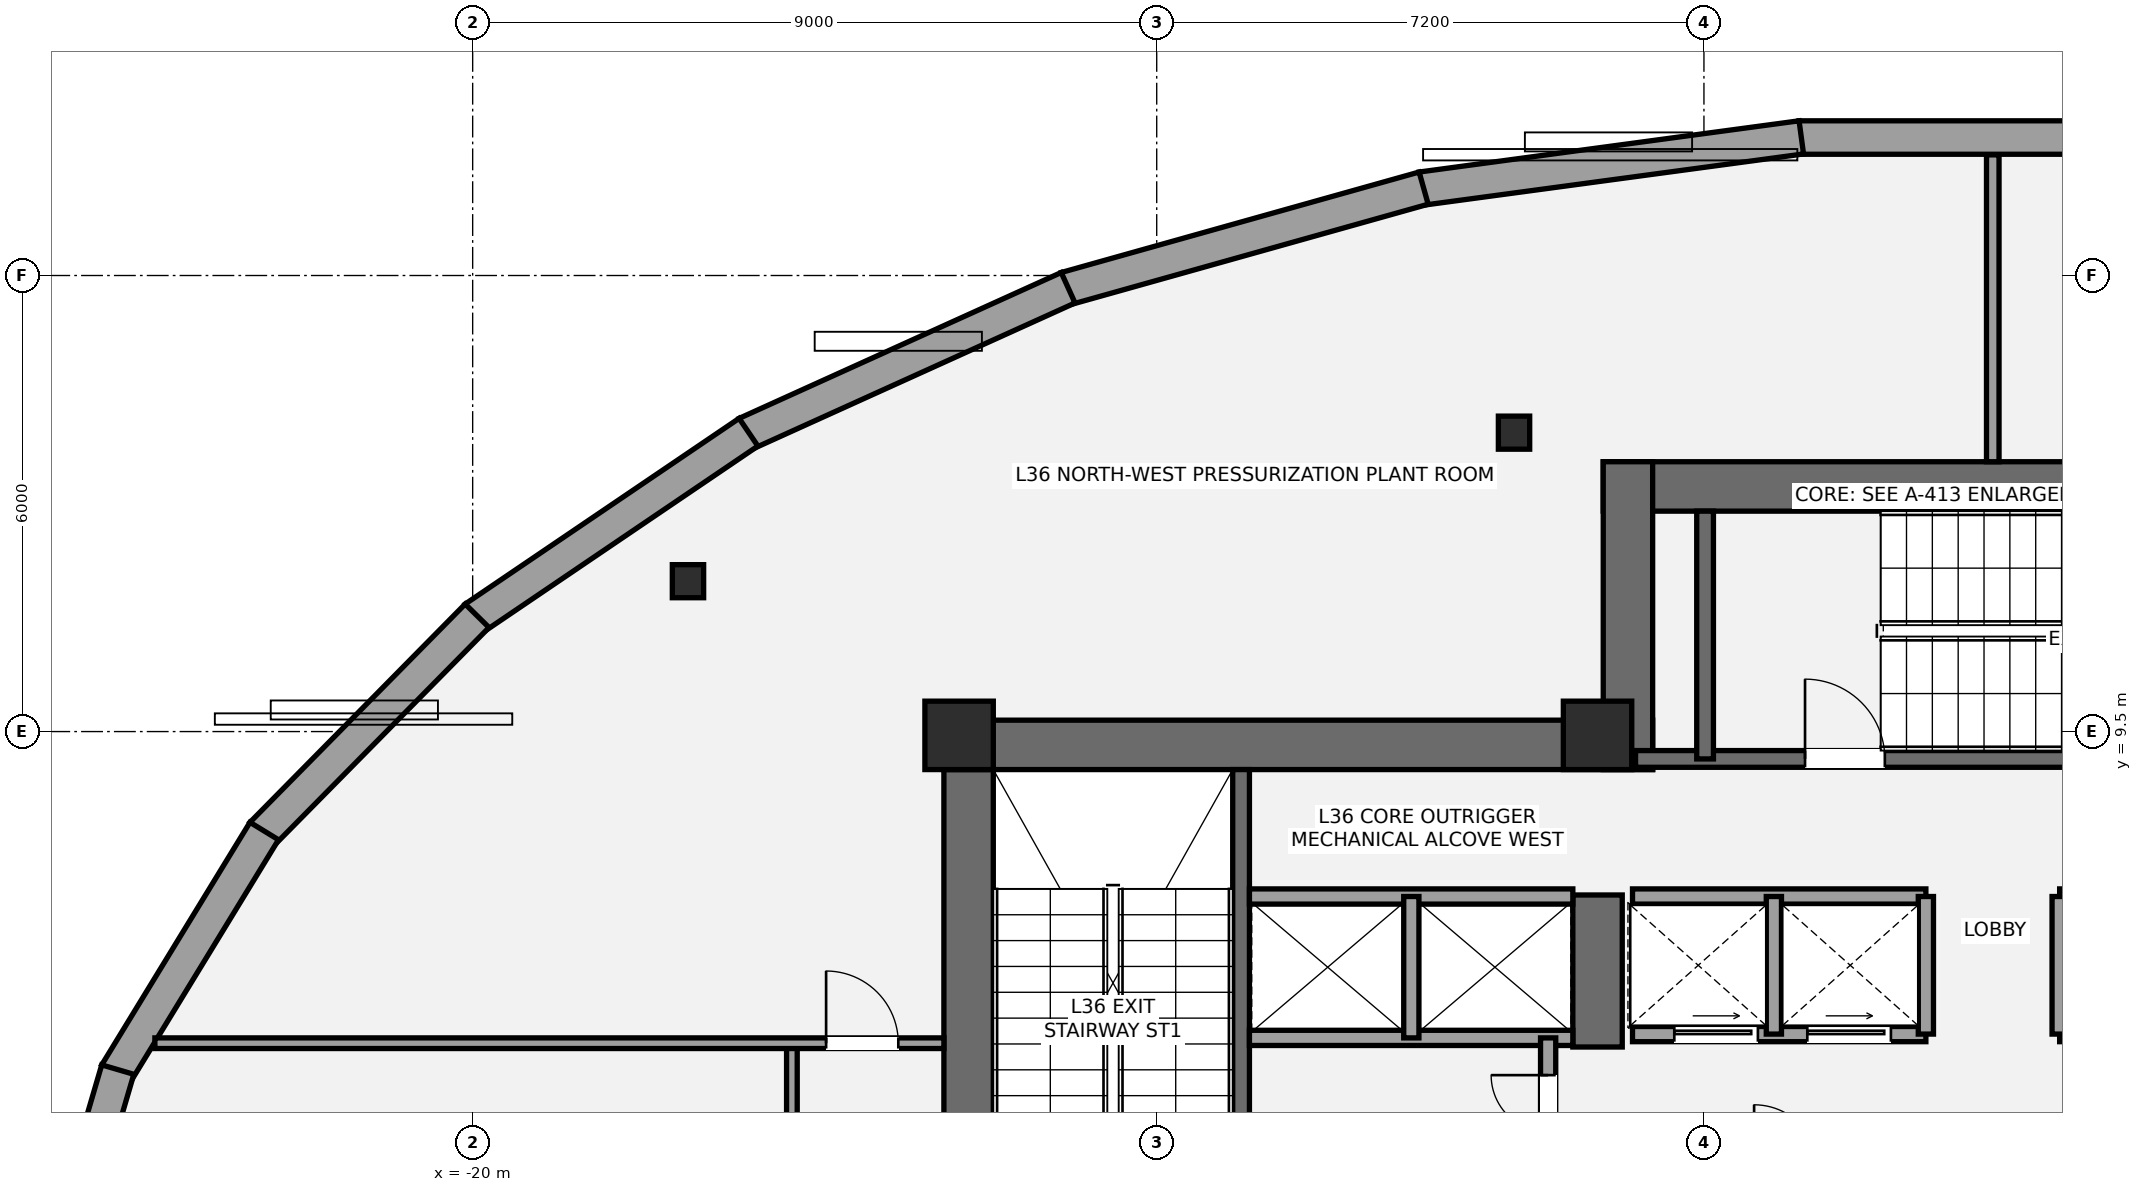
"""IFC4 building model, lengths in metres.
Left out: names, types, materials, properties, quantities, classifications, styles, units other than length and angle.
Written with IfcOpenShell. Run it as: python <this file> out.ifc"""

import sys

from ifc_helpers import new_model, si_unit, direction, frame, frame_2d, origin, origin_2d, place, context, subcontext, project, spatial, rectangle, i_section, extrude, element, fill, save


model = new_model("IFC4")
c1 = context("Model", 3, precision=1e-05, world=origin(), true_north=direction((0.0, 1.0)))
c2 = subcontext(c1, "Body", "Model", "MODEL_VIEW")
j1 = project(units=[si_unit("LENGTHUNIT", "METRE"), si_unit("PLANEANGLEUNIT", "RADIAN")], contexts=[c1])
p1 = place(None, origin())
s1 = spatial("IfcSite", under=j1, at=p1, CompositionType="ELEMENT")
p2 = place(p1, origin())
s2 = spatial("IfcBuilding", under=s1, at=p2, CompositionType="ELEMENT")
p3 = place(p2, frame((0.0, 0.0, 135.1)))
s3 = spatial("IfcBuildingStorey", under=s2, at=p3, CompositionType="ELEMENT", Elevation=135.1)
p4 = place(p3, frame((-13.475, 1.2, 0.0), z_axis=(0.0, 0.0, 1.0), x_axis=(0.0, 1.0, 0.0)))
e1 = element("IfcWall", 1, at=p4, inside=s3, PredefinedType="SHEAR", context=c2, shape_type="SweptSolid", body=[
    extrude(rectangle(XDim=8.45, YDim=0.65, at=frame_2d((4.225, 0.0))), origin(), (0.0, 0.0, 1.0), 4.5),
])
p5 = place(p3, frame((-13.8, 9.325, 0.0), z_axis=(0.0, 0.0, 1.0), x_axis=(1.0, 0.0, 0.0)))
e2 = element("IfcWall", 2, at=p5, inside=s3, PredefinedType="SHEAR", context=c2, shape_type="SweptSolid", body=[
    extrude(rectangle(XDim=9.325, YDim=0.65, at=frame_2d((4.663, 0.0))), origin(), (0.0, 0.0, 1.0), 4.5),
])
p6 = place(p3, frame((-5.2, 5.35, 0.0), z_axis=(0.0, 0.0, 1.0), x_axis=(0.0, 1.0, 0.0)))
e3 = element("IfcWall", 3, at=p6, inside=s3, PredefinedType="SHEAR", context=c2, shape_type="SweptSolid", body=[
    extrude(rectangle(XDim=2.0, YDim=0.65, at=frame_2d((1.0, 0.0))), origin(), (0.0, 0.0, 1.0), 4.5),
])
p7 = place(p3, frame((-9.89, 1.85, 0.0), z_axis=(0.0, 0.0, 1.0), x_axis=(0.0, 1.0, 0.0)))
e4 = element("IfcWall", 4, at=p7, inside=s3, PredefinedType="SHEAR", context=c2, shape_type="SweptSolid", body=[
    extrude(rectangle(XDim=7.15, YDim=0.22, at=frame_2d((3.575, 0.0))), origin(), (0.0, 0.0, 1.0), 4.5),
])
p8 = place(p3, frame((-5.125, 12.725, 0.0), z_axis=(0.0, 0.0, 1.0), x_axis=(1.0, 0.0, 0.0)))
e5 = element("IfcWall", 5, at=p8, inside=s3, PredefinedType="SHEAR", context=c2, shape_type="SweptSolid", body=[
    extrude(rectangle(XDim=10.25, YDim=0.65, at=frame_2d((5.125, 0.0))), origin(), (0.0, 0.0, 1.0), 4.5),
])
p9 = place(p3, frame((-4.8, 9.0, 0.0), z_axis=(0.0, 0.0, 1.0), x_axis=(0.0, 1.0, 0.0)))
e6 = element("IfcWall", 6, at=p9, inside=s3, PredefinedType="SHEAR", context=c2, shape_type="SweptSolid", body=[
    extrude(rectangle(XDim=4.05, YDim=0.65, at=frame_2d((2.025, 0.0))), origin(), (0.0, 0.0, 1.0), 4.5),
])
p10 = place(p3, frame((-4.7, 9.14, 0.0), z_axis=(0.0, 0.0, 1.0), x_axis=(1.0, 0.0, 0.0)))
e7 = element("IfcWall", 7, at=p10, inside=s3, PredefinedType="SHEAR", context=c2, shape_type="SweptSolid", body=[
    extrude(rectangle(XDim=9.3, YDim=0.22, at=frame_2d((4.65, 0.0))), origin(), (0.0, 0.0, 1.0), 4.5),
])
p11 = place(p10, frame((2.23, 0.0, 0.0)))
e8 = element("IfcOpeningElement", 8, at=p11, cuts=e7, PredefinedType="OPENING", context=c2, shape_type="SweptSolid", body=[
    extrude(rectangle(XDim=1.05, YDim=2.15, at=frame_2d((0.525, 1.075))), frame((0.0, 0.12, 0.0), z_axis=(0.0, -1.0, 0.0), x_axis=(1.0, 0.0, 0.0)), (0.0, 0.0, 1.0), 0.24),
])
p12 = place(p3, frame((-3.785, 9.14, 0.0), z_axis=(0.0, 0.0, 1.0), x_axis=(0.0, 1.0, 0.0)))
e9 = element("IfcWall", 9, at=p12, inside=s3, PredefinedType="SHEAR", context=c2, shape_type="SweptSolid", body=[
    extrude(rectangle(XDim=3.26, YDim=0.22, at=frame_2d((1.63, 0.0))), origin(), (0.0, 0.0, 1.0), 4.5),
])
for number, where, z_axis, x_axis in (
    (10, (-13.6, 9.45, 0.0), (0.0, 0.0, 1.0), (1.0, 0.0, 0.0)),
    (11, (-5.2, 9.45, 0.0), (0.0, 0.0, 1.0), (1.0, 0.0, 0.0)),
):
    element("IfcColumn", number, at=place(p3, frame(where, z_axis=z_axis, x_axis=x_axis)), inside=s3, PredefinedType="COLUMN", context=c2, shape_type="SweptSolid", body=[
        extrude(rectangle(XDim=0.9, YDim=0.9, at=origin_2d()), origin(), (0.0, 0.0, 1.0), 4.5),
    ])
for number, where, z_axis, x_axis in (
    (12, (-6.299, 13.433, 0.0), (0.0, 0.0, 1.0), (1.0, 0.0, 0.0)),
    (13, (-17.167, 11.478, 0.0), (0.0, 0.0, 1.0), (1.0, 0.0, 0.0)),
):
    element("IfcColumn", number, at=place(p3, frame(where, z_axis=z_axis, x_axis=x_axis)), inside=s3, PredefinedType="COLUMN", context=c2, shape_type="SweptSolid", body=[
        extrude(i_section(OverallWidth=0.412, OverallDepth=0.435, WebThickness=0.036, FlangeThickness=0.057, at=origin_2d()), origin(), (0.0, 0.0, 1.0), 4.5),
    ])
p13 = place(p3, frame((-2.548, 17.315, 0.0), z_axis=(0.0, 0.0, 1.0), x_axis=(1.0, 0.0, 0.0)))
e14 = element("IfcWall", 14, at=p13, inside=s3, PredefinedType="STANDARD", context=c2, shape_type="SweptSolid", body=[
    extrude(rectangle(XDim=5.097, YDim=0.44, at=frame_2d((2.548, 0.0))), origin(), (0.0, 0.0, 1.0), 3.498),
])
p14 = place(p3, frame((-7.518, 16.643, 0.0), z_axis=(0.0, 0.0, 1.0), x_axis=(0.99103751038, 0.133583880086, 0.0)))
e15 = element("IfcWall", 15, at=p14, inside=s3, PredefinedType="STANDARD", context=c2, shape_type="SweptSolid", body=[
    extrude(rectangle(XDim=5.044, YDim=0.44, at=frame_2d((2.522, 0.0))), origin(), (0.0, 0.0, 1.0), 3.498),
])
p15 = place(p3, frame((-12.197, 15.328, 0.0), z_axis=(0.0, 0.0, 1.0), x_axis=(0.962790668442, 0.270248272446, 0.0)))
e16 = element("IfcWall", 16, at=p15, inside=s3, PredefinedType="STANDARD", context=c2, shape_type="SweptSolid", body=[
    extrude(rectangle(XDim=4.891, YDim=0.44, at=frame_2d((2.445, 0.0))), origin(), (0.0, 0.0, 1.0), 3.498),
])
p16 = place(p3, frame((-16.403, 13.42, 0.0), z_axis=(0.0, 0.0, 1.0), x_axis=(0.910938924115, 0.412541242221, 0.0)))
e17 = element("IfcWall", 17, at=p16, inside=s3, PredefinedType="STANDARD", context=c2, shape_type="SweptSolid", body=[
    extrude(rectangle(XDim=4.652, YDim=0.44, at=frame_2d((2.326, 0.0))), origin(), (0.0, 0.0, 1.0), 3.498),
])
p17 = place(p3, frame((-19.975, 10.996, 0.0), z_axis=(0.0, 0.0, 1.0), x_axis=(0.827816201219, 0.56099940909, 0.0)))
e18 = element("IfcWall", 18, at=p17, inside=s3, PredefinedType="STANDARD", context=c2, shape_type="SweptSolid", body=[
    extrude(rectangle(XDim=4.354, YDim=0.44, at=frame_2d((2.177, 0.0))), origin(), (0.0, 0.0, 1.0), 3.498),
])
p18 = place(p3, frame((-22.773, 8.152, 0.0), z_axis=(0.0, 0.0, 1.0), x_axis=(0.702094935552, 0.712083352897, 0.0)))
e19 = element("IfcWall", 19, at=p18, inside=s3, PredefinedType="STANDARD", context=c2, shape_type="SweptSolid", body=[
    extrude(rectangle(XDim=4.033, YDim=0.44, at=frame_2d((2.017, 0.0))), origin(), (0.0, 0.0, 1.0), 3.498),
])
p19 = place(p3, frame((-24.693, 5.0, 0.0), z_axis=(0.0, 0.0, 1.0), x_axis=(0.521476412293, 0.853265698022, 0.0)))
e20 = element("IfcWall", 20, at=p19, inside=s3, PredefinedType="STANDARD", context=c2, shape_type="SweptSolid", body=[
    extrude(rectangle(XDim=3.74, YDim=0.44, at=frame_2d((1.87, 0.0))), origin(), (0.0, 0.0, 1.0), 3.498),
])
p20 = place(p3, frame((-25.664, 1.665, 0.0), z_axis=(0.0, 0.0, 1.0), x_axis=(0.28170956188, 0.959499725245, 0.0)))
e21 = element("IfcWall", 21, at=p20, inside=s3, PredefinedType="STANDARD", context=c2, shape_type="SweptSolid", body=[
    extrude(rectangle(XDim=3.531, YDim=0.44, at=frame_2d((1.765, 0.0))), origin(), (0.0, 0.0, 1.0), 3.498),
])
for number, where, z_axis, x_axis in (
    (22, (-9.78, 5.47, 0.0), (0.0, 0.0, 1.0), (1.0, 0.0, 0.0)),
    (23, (-9.78, 7.33, 0.0), (0.0, 0.0, 1.0), (1.0, 0.0, 0.0)),
):
    element("IfcWall", number, at=place(p3, frame(where, z_axis=z_axis, x_axis=x_axis)), inside=s3, PredefinedType="SOLIDWALL", context=c2, shape_type="SweptSolid", body=[
        extrude(rectangle(XDim=4.255, YDim=0.2, at=frame_2d((2.127, 0.0))), origin(), (0.0, 0.0, 1.0), 4.28),
    ])
p21 = place(p3, frame((-7.65, 5.47, 0.0), z_axis=(0.0, 0.0, 1.0), x_axis=(0.0, 1.0, 0.0)))
e24 = element("IfcWall", 24, at=p21, inside=s3, PredefinedType="SOLIDWALL", context=c2, shape_type="SweptSolid", body=[
    extrude(rectangle(XDim=1.86, YDim=0.2, at=frame_2d((0.93, 0.0))), origin(), (0.0, 0.0, 1.0), 4.28),
])
p22 = place(p3, frame((-5.85, 3.78, 0.0), z_axis=(0.0, 0.0, 1.0), x_axis=(0.0, 1.0, 0.0)))
e25 = element("IfcWall", 25, at=p22, inside=s3, PredefinedType="SOLIDWALL", context=c2, shape_type="SweptSolid", body=[
    extrude(rectangle(XDim=1.69, YDim=0.2, at=frame_2d((0.845, 0.0))), origin(), (0.0, 0.0, 1.0), 4.28),
])
p23 = place(p22, frame((0.45, 0.0, 0.0)))
e26 = element("IfcOpeningElement", 26, at=p23, cuts=e25, PredefinedType="OPENING", context=c2, shape_type="SweptSolid", body=[
    extrude(rectangle(XDim=0.75, YDim=2.1, at=frame_2d((0.375, 1.05))), frame((0.0, 0.11, 0.0), z_axis=(0.0, -1.0, 0.0), x_axis=(1.0, 0.0, 0.0)), (0.0, 0.0, 1.0), 0.22),
])
p24 = place(p3, frame((-4.74, 5.52, 0.0), z_axis=(0.0, 0.0, 1.0), x_axis=(1.0, 0.0, 0.0)))
e27 = element("IfcWall", 27, at=p24, inside=s3, PredefinedType="SOLIDWALL", context=c2, shape_type="SweptSolid", body=[
    extrude(rectangle(XDim=3.86, YDim=0.2, at=frame_2d((1.93, 0.0))), origin(), (0.0, 0.0, 1.0), 4.28),
])
p25 = place(p24, frame((0.55, 0.0, 0.0)))
e28 = element("IfcOpeningElement", 28, at=p25, cuts=e27, PredefinedType="OPENING", context=c2, shape_type="SweptSolid", body=[
    extrude(rectangle(XDim=1.1, YDim=2.2, at=frame_2d((0.55, 1.1))), frame((0.0, 0.11, 0.0), z_axis=(0.0, -1.0, 0.0), x_axis=(1.0, 0.0, 0.0)), (0.0, 0.0, 1.0), 0.22),
])
p26 = place(p24, frame((2.3, 0.0, 0.0)))
e29 = element("IfcOpeningElement", 29, at=p26, cuts=e27, PredefinedType="OPENING", context=c2, shape_type="SweptSolid", body=[
    extrude(rectangle(XDim=1.1, YDim=2.2, at=frame_2d((0.55, 1.1))), frame((0.0, 0.11, 0.0), z_axis=(0.0, -1.0, 0.0), x_axis=(1.0, 0.0, 0.0)), (0.0, 0.0, 1.0), 0.22),
])
p27 = place(p3, frame((0.88, 5.52, 0.0), z_axis=(0.0, 0.0, 1.0), x_axis=(1.0, 0.0, 0.0)))
e30 = element("IfcWall", 30, at=p27, inside=s3, PredefinedType="SOLIDWALL", context=c2, shape_type="SweptSolid", body=[
    extrude(rectangle(XDim=3.86, YDim=0.2, at=frame_2d((1.93, 0.0))), origin(), (0.0, 0.0, 1.0), 4.28),
])
p28 = place(p27, frame((0.55, 0.0, 0.0)))
e31 = element("IfcOpeningElement", 31, at=p28, cuts=e30, PredefinedType="OPENING", context=c2, shape_type="SweptSolid", body=[
    extrude(rectangle(XDim=1.1, YDim=2.2, at=frame_2d((0.55, 1.1))), frame((0.0, 0.11, 0.0), z_axis=(0.0, -1.0, 0.0), x_axis=(1.0, 0.0, 0.0)), (0.0, 0.0, 1.0), 0.22),
])
p29 = place(p27, frame((2.55, 0.0, 0.0)))
e32 = element("IfcOpeningElement", 32, at=p29, cuts=e30, PredefinedType="OPENING", context=c2, shape_type="SweptSolid", body=[
    extrude(rectangle(XDim=1.1, YDim=2.2, at=frame_2d((0.55, 1.1))), frame((0.0, 0.11, 0.0), z_axis=(0.0, -1.0, 0.0), x_axis=(1.0, 0.0, 0.0)), (0.0, 0.0, 1.0), 0.22),
])
for number, where, z_axis, x_axis in (
    (33, (-4.74, 7.33, 0.0), (0.0, 0.0, 1.0), (1.0, 0.0, 0.0)),
    (34, (0.88, 7.33, 0.0), (0.0, 0.0, 1.0), (1.0, 0.0, 0.0)),
):
    element("IfcWall", number, at=place(p3, frame(where, z_axis=z_axis, x_axis=x_axis)), inside=s3, PredefinedType="SOLIDWALL", context=c2, shape_type="SweptSolid", body=[
        extrude(rectangle(XDim=3.86, YDim=0.2, at=frame_2d((1.93, 0.0))), origin(), (0.0, 0.0, 1.0), 4.28),
    ])
for number, where, z_axis, x_axis in (
    (35, (-2.88, 5.52, 0.0), (0.0, 0.0, 1.0), (0.0, 1.0, 0.0)),
    (36, (-0.88, 5.52, 0.0), (0.0, 0.0, 1.0), (0.0, 1.0, 0.0)),
    (37, (0.88, 5.52, 0.0), (0.0, 0.0, 1.0), (0.0, 1.0, 0.0)),
):
    element("IfcWall", number, at=place(p3, frame(where, z_axis=z_axis, x_axis=x_axis)), inside=s3, PredefinedType="SOLIDWALL", context=c2, shape_type="SweptSolid", body=[
        extrude(rectangle(XDim=1.81, YDim=0.2, at=frame_2d((0.905, 0.0))), origin(), (0.0, 0.0, 1.0), 4.28),
    ])
p30 = place(p3, frame((-15.8, -5.8, 0.0), z_axis=(0.0, 0.0, 1.0), x_axis=(0.0, 1.0, 0.0)))
e38 = element("IfcWall", 38, at=p30, inside=s3, PredefinedType="PARTITIONING", context=c2, shape_type="SweptSolid", body=[
    extrude(rectangle(XDim=11.2, YDim=0.14, at=frame_2d((5.6, 0.0))), origin(), (0.0, 0.0, 1.0), 2.47),
])
p31 = place(p30, frame((0.35, 0.0, 0.0)))
e39 = element("IfcOpeningElement", 39, at=p31, cuts=e38, PredefinedType="OPENING", context=c2, shape_type="SweptSolid", body=[
    extrude(rectangle(XDim=0.95, YDim=2.15, at=frame_2d((0.475, 1.075))), frame((0.0, 0.08, 0.0), z_axis=(0.0, -1.0, 0.0), x_axis=(1.0, 0.0, 0.0)), (0.0, 0.0, 1.0), 0.16),
])
p32 = place(p30, frame((1.9, 0.0, 0.0)))
e40 = element("IfcOpeningElement", 40, at=p32, cuts=e38, PredefinedType="OPENING", context=c2, shape_type="SweptSolid", body=[
    extrude(rectangle(XDim=0.95, YDim=2.15, at=frame_2d((0.475, 1.075))), frame((0.0, 0.08, 0.0), z_axis=(0.0, -1.0, 0.0), x_axis=(1.0, 0.0, 0.0)), (0.0, 0.0, 1.0), 0.16),
])
p33 = place(p3, frame((-24.181, 5.4, 0.0), z_axis=(0.0, 0.0, 1.0), x_axis=(1.0, 0.0, 0.0)))
e41 = element("IfcWall", 41, at=p33, inside=s3, PredefinedType="PARTITIONING", context=c2, shape_type="SweptSolid", body=[
    extrude(rectangle(XDim=10.381, YDim=0.14, at=frame_2d((5.19, 0.0))), origin(), (0.0, 0.0, 1.0), 4.28),
])
p34 = place(p33, frame((8.831, 0.0, 0.0)))
e42 = element("IfcOpeningElement", 42, at=p34, cuts=e41, PredefinedType="OPENING", context=c2, shape_type="SweptSolid", body=[
    extrude(rectangle(XDim=0.95, YDim=2.15, at=frame_2d((0.475, 1.075))), frame((0.0, 0.08, 0.0), z_axis=(0.0, -1.0, 0.0), x_axis=(1.0, 0.0, 0.0)), (0.0, 0.0, 1.0), 0.16),
])
p35 = place(p3, frame((0.0, 13.05, 0.0), z_axis=(0.0, 0.0, 1.0), x_axis=(0.0, 1.0, 0.0)))
e43 = element("IfcWall", 43, at=p35, inside=s3, PredefinedType="PARTITIONING", context=c2, shape_type="SweptSolid", body=[
    extrude(rectangle(XDim=4.037, YDim=0.165, at=frame_2d((2.019, 0.0))), origin(), (0.0, 0.0, 1.0), 4.28),
])
p36 = place(p11, origin())
e44 = element("IfcDoor", 44, at=p36, inside=s3, OperationType="SINGLE_SWING_LEFT", PredefinedType="DOOR", context=c2, shape_type="SweptSolid", body=[
    extrude(rectangle(XDim=1.05, YDim=2.15, at=frame_2d((0.525, 1.075))), frame((0.0, 0.025, 0.0), z_axis=(0.0, -1.0, 0.0), x_axis=(1.0, 0.0, 0.0)), (0.0, 0.0, 1.0), 0.05),
])
fill(e8, e44)
p37 = place(p23, origin())
e45 = element("IfcDoor", 45, at=p37, inside=s3, OperationType="SINGLE_SWING_RIGHT", PredefinedType="DOOR", context=c2, shape_type="SweptSolid", body=[
    extrude(rectangle(XDim=0.75, YDim=2.1, at=frame_2d((0.375, 1.05))), frame((0.0, 0.025, 0.0), z_axis=(0.0, -1.0, 0.0), x_axis=(1.0, 0.0, 0.0)), (0.0, 0.0, 1.0), 0.05),
])
fill(e26, e45)
p38 = place(p25, origin())
e46 = element("IfcDoor", 46, at=p38, inside=s3, OperationType="SLIDING_TO_LEFT", PredefinedType="DOOR", context=c2, shape_type="SweptSolid", body=[
    extrude(rectangle(XDim=1.1, YDim=2.2, at=frame_2d((0.55, 1.1))), frame((0.0, 0.025, 0.0), z_axis=(0.0, -1.0, 0.0), x_axis=(1.0, 0.0, 0.0)), (0.0, 0.0, 1.0), 0.05),
])
fill(e28, e46)
p39 = place(p26, origin())
e47 = element("IfcDoor", 47, at=p39, inside=s3, OperationType="SLIDING_TO_LEFT", PredefinedType="DOOR", context=c2, shape_type="SweptSolid", body=[
    extrude(rectangle(XDim=1.1, YDim=2.2, at=frame_2d((0.55, 1.1))), frame((0.0, 0.025, 0.0), z_axis=(0.0, -1.0, 0.0), x_axis=(1.0, 0.0, 0.0)), (0.0, 0.0, 1.0), 0.05),
])
fill(e29, e47)
p40 = place(p34, origin())
e48 = element("IfcDoor", 48, at=p40, inside=s3, OperationType="SINGLE_SWING_LEFT", PredefinedType="DOOR", context=c2, shape_type="SweptSolid", body=[
    extrude(rectangle(XDim=0.95, YDim=2.15, at=frame_2d((0.475, 1.075))), frame((0.0, 0.025, 0.0), z_axis=(0.0, -1.0, 0.0), x_axis=(1.0, 0.0, 0.0)), (0.0, 0.0, 1.0), 0.05),
])
fill(e42, e48)
save(model, sys.argv[1])
